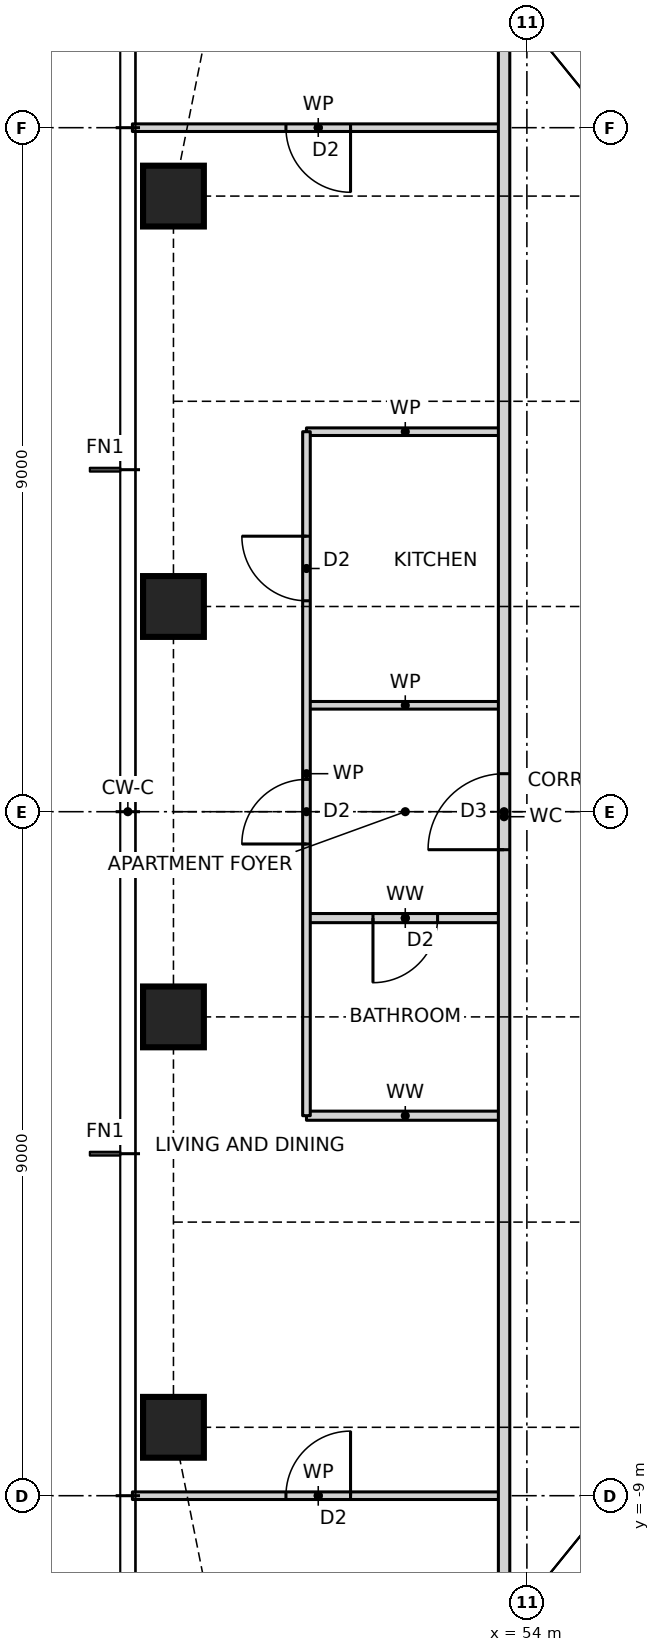
"""IFC4 building model, lengths in metres.
Left out: names, types, materials, properties, quantities, classifications, styles, units other than length and angle.
Written with IfcOpenShell. Run it as: python <this file> out.ifc"""

import sys

from ifc_helpers import new_model, si_unit, direction, frame, frame_2d, origin, origin_2d, place, context, subcontext, project, spatial, rectangle, hollow_rectangle, extrude, element, fill, save


model = new_model("IFC4")
c1 = context("Model", 3, precision=1e-05, world=origin(), true_north=direction((0.0, 1.0)))
c2 = subcontext(c1, "Body", "Model", "MODEL_VIEW")
j1 = project(units=[si_unit("LENGTHUNIT", "METRE"), si_unit("PLANEANGLEUNIT", "RADIAN")], contexts=[c1])
p1 = place(None, origin())
s1 = spatial("IfcSite", under=j1, at=p1, CompositionType="ELEMENT")
p2 = place(p1, origin())
s2 = spatial("IfcBuilding", under=s1, at=p2, CompositionType="ELEMENT")
p3 = place(p2, frame((0.0, 0.0, 126.0)))
s3 = spatial("IfcBuildingStorey", under=s2, at=p3, CompositionType="ELEMENT", Elevation=126.0)
for number, where, z_axis, x_axis in (
    (1, (49.35, 8.1, 0.0), (0.0, 0.0, 1.0), (1.0, 0.0, 0.0)),
    (2, (49.35, 2.7, 0.0), (0.0, 0.0, 1.0), (1.0, 0.0, 0.0)),
    (3, (49.35, -2.7, 0.0), (0.0, 0.0, 1.0), (1.0, 0.0, 0.0)),
    (4, (49.35, -8.1, 0.0), (0.0, 0.0, 1.0), (1.0, 0.0, 0.0)),
):
    element("IfcColumn", number, at=place(p3, frame(where, z_axis=z_axis, x_axis=x_axis)), inside=s3, PredefinedType="COLUMN", context=c2, shape_type="SweptSolid", body=[
        extrude(hollow_rectangle(XDim=0.8, YDim=0.8, WallThickness=0.1, at=origin_2d()), origin(), (0.0, 0.0, 1.0), 3.5),
    ])
p4 = place(p3, frame((48.81, -9.0, 0.0), z_axis=(0.0, 0.0, 1.0), x_axis=(1.0, 0.0, 0.0)))
e5 = element("IfcWall", 5, at=p4, inside=s3, PredefinedType="PARTITIONING", context=c2, shape_type="SweptSolid", body=[
    extrude(rectangle(XDim=4.89, YDim=0.1, at=frame_2d((2.445, 0.0))), origin(), (0.0, 0.0, 1.0), 3.25),
])
p5 = place(p4, frame((2.02, 0.0, 0.0)))
e6 = element("IfcOpeningElement", 6, at=p5, cuts=e5, PredefinedType="OPENING", context=c2, shape_type="SweptSolid", body=[
    extrude(rectangle(XDim=0.85, YDim=2.1, at=frame_2d((0.425, 1.05))), frame((0.0, 0.06, 0.0), z_axis=(0.0, -1.0, 0.0), x_axis=(1.0, 0.0, 0.0)), (0.0, 0.0, 1.0), 0.12),
])
p6 = place(p3, frame((51.1, -4.0, 0.0), z_axis=(0.0, 0.0, 1.0), x_axis=(1.0, 0.0, 0.0)))
e7 = element("IfcWall", 7, at=p6, inside=s3, PredefinedType="PARTITIONING", context=c2, shape_type="SweptSolid", body=[
    extrude(rectangle(XDim=2.6, YDim=0.12, at=frame_2d((1.3, 0.0))), origin(), (0.0, 0.0, 1.0), 3.25),
])
p7 = place(p3, frame((51.1, -1.4, 0.0), z_axis=(0.0, 0.0, 1.0), x_axis=(1.0, 0.0, 0.0)))
e8 = element("IfcWall", 8, at=p7, inside=s3, PredefinedType="PARTITIONING", context=c2, shape_type="SweptSolid", body=[
    extrude(rectangle(XDim=2.6, YDim=0.12, at=frame_2d((1.3, 0.0))), origin(), (0.0, 0.0, 1.0), 3.25),
])
p8 = place(p7, frame((0.875, 0.0, 0.0)))
e9 = element("IfcOpeningElement", 9, at=p8, cuts=e8, PredefinedType="OPENING", context=c2, shape_type="SweptSolid", body=[
    extrude(rectangle(XDim=0.85, YDim=2.1, at=frame_2d((0.425, 1.05))), frame((0.0, 0.07, 0.0), z_axis=(0.0, -1.0, 0.0), x_axis=(1.0, 0.0, 0.0)), (0.0, 0.0, 1.0), 0.14),
])
for number, where, z_axis, x_axis in (
    (10, (51.1, 1.4, 0.0), (0.0, 0.0, 1.0), (1.0, 0.0, 0.0)),
    (11, (51.1, 5.0, 0.0), (0.0, 0.0, 1.0), (1.0, 0.0, 0.0)),
):
    element("IfcWall", number, at=place(p3, frame(where, z_axis=z_axis, x_axis=x_axis)), inside=s3, PredefinedType="PARTITIONING", context=c2, shape_type="SweptSolid", body=[
        extrude(rectangle(XDim=2.6, YDim=0.1, at=frame_2d((1.3, 0.0))), origin(), (0.0, 0.0, 1.0), 3.25),
    ])
p9 = place(p3, frame((48.81, 9.0, 0.0), z_axis=(0.0, 0.0, 1.0), x_axis=(1.0, 0.0, 0.0)))
e12 = element("IfcWall", 12, at=p9, inside=s3, PredefinedType="PARTITIONING", context=c2, shape_type="SweptSolid", body=[
    extrude(rectangle(XDim=4.89, YDim=0.1, at=frame_2d((2.445, 0.0))), origin(), (0.0, 0.0, 1.0), 3.25),
])
p10 = place(p9, frame((2.02, 0.0, 0.0)))
e13 = element("IfcOpeningElement", 13, at=p10, cuts=e12, PredefinedType="OPENING", context=c2, shape_type="SweptSolid", body=[
    extrude(rectangle(XDim=0.85, YDim=2.1, at=frame_2d((0.425, 1.05))), frame((0.0, 0.06, 0.0), z_axis=(0.0, -1.0, 0.0), x_axis=(1.0, 0.0, 0.0)), (0.0, 0.0, 1.0), 0.12),
])
p11 = place(p3, frame((53.7, -10.9, 0.0), z_axis=(0.0, 0.0, 1.0), x_axis=(0.0, 1.0, 0.0)))
e14 = element("IfcWall", 14, at=p11, inside=s3, PredefinedType="PARTITIONING", context=c2, shape_type="SweptSolid", body=[
    extrude(rectangle(XDim=21.668, YDim=0.15, at=frame_2d((10.834, 0.0))), origin(), (0.0, 0.0, 1.0), 3.25),
])
p12 = place(p11, frame((10.4, 0.0, 0.0)))
e15 = element("IfcOpeningElement", 15, at=p12, cuts=e14, PredefinedType="OPENING", context=c2, shape_type="SweptSolid", body=[
    extrude(rectangle(XDim=1.0, YDim=2.1, at=frame_2d((0.5, 1.05))), frame((0.0, 0.085, 0.0), z_axis=(0.0, -1.0, 0.0), x_axis=(1.0, 0.0, 0.0)), (0.0, 0.0, 1.0), 0.17),
])
p13 = place(p3, frame((51.1, -4.0, 0.0), z_axis=(0.0, 0.0, 1.0), x_axis=(0.0, 1.0, 0.0)))
e16 = element("IfcWall", 16, at=p13, inside=s3, PredefinedType="PARTITIONING", context=c2, shape_type="SweptSolid", body=[
    extrude(rectangle(XDim=9.0, YDim=0.1, at=frame_2d((4.5, 0.0))), origin(), (0.0, 0.0, 1.0), 3.25),
])
p14 = place(p13, frame((6.775, 0.0, 0.0)))
e17 = element("IfcOpeningElement", 17, at=p14, cuts=e16, PredefinedType="OPENING", context=c2, shape_type="SweptSolid", body=[
    extrude(rectangle(XDim=0.85, YDim=2.1, at=frame_2d((0.425, 1.05))), frame((0.0, 0.06, 0.0), z_axis=(0.0, -1.0, 0.0), x_axis=(1.0, 0.0, 0.0)), (0.0, 0.0, 1.0), 0.12),
])
p15 = place(p13, frame((3.575, 0.0, 0.0)))
e18 = element("IfcOpeningElement", 18, at=p15, cuts=e16, PredefinedType="OPENING", context=c2, shape_type="SweptSolid", body=[
    extrude(rectangle(XDim=0.85, YDim=2.1, at=frame_2d((0.425, 1.05))), frame((0.0, 0.06, 0.0), z_axis=(0.0, -1.0, 0.0), x_axis=(1.0, 0.0, 0.0)), (0.0, 0.0, 1.0), 0.12),
])
p16 = place(p14, origin())
e19 = element("IfcDoor", 19, at=p16, inside=s3, OperationType="SINGLE_SWING_RIGHT", PredefinedType="DOOR", context=c2, shape_type="SweptSolid", body=[
    extrude(rectangle(XDim=0.85, YDim=2.1, at=frame_2d((0.425, 1.05))), frame((0.0, 0.025, 0.0), z_axis=(0.0, -1.0, 0.0), x_axis=(1.0, 0.0, 0.0)), (0.0, 0.0, 1.0), 0.05),
])
fill(e17, e19)
p17 = place(p12, origin())
e20 = element("IfcDoor", 20, at=p17, inside=s3, OperationType="SINGLE_SWING_LEFT", PredefinedType="DOOR", context=c2, shape_type="SweptSolid", body=[
    extrude(rectangle(XDim=1.0, YDim=2.1, at=frame_2d((0.5, 1.05))), frame((0.0, 0.025, 0.0), z_axis=(0.0, -1.0, 0.0), x_axis=(1.0, 0.0, 0.0)), (0.0, 0.0, 1.0), 0.05),
])
fill(e15, e20)
p18 = place(p15, origin())
e21 = element("IfcDoor", 21, at=p18, inside=s3, OperationType="SINGLE_SWING_LEFT", PredefinedType="DOOR", context=c2, shape_type="SweptSolid", body=[
    extrude(rectangle(XDim=0.85, YDim=2.1, at=frame_2d((0.425, 1.05))), frame((0.0, 0.025, 0.0), z_axis=(0.0, -1.0, 0.0), x_axis=(1.0, 0.0, 0.0)), (0.0, 0.0, 1.0), 0.05),
])
fill(e18, e21)
p19 = place(p8, frame((0.85, 0.0, 0.0), z_axis=(0.0, 0.0, 1.0), x_axis=(-1.0, 0.0, 0.0)))
e22 = element("IfcDoor", 22, at=p19, inside=s3, OperationType="SINGLE_SWING_RIGHT", PredefinedType="DOOR", context=c2, shape_type="SweptSolid", body=[
    extrude(rectangle(XDim=0.85, YDim=2.1, at=frame_2d((0.425, 1.05))), frame((0.0, 0.025, 0.0), z_axis=(0.0, -1.0, 0.0), x_axis=(1.0, 0.0, 0.0)), (0.0, 0.0, 1.0), 0.05),
])
fill(e9, e22)
p20 = place(p10, frame((0.85, 0.0, 0.0), z_axis=(0.0, 0.0, 1.0), x_axis=(-1.0, 0.0, 0.0)))
e23 = element("IfcDoor", 23, at=p20, inside=s3, OperationType="SINGLE_SWING_LEFT", PredefinedType="DOOR", context=c2, shape_type="SweptSolid", body=[
    extrude(rectangle(XDim=0.85, YDim=2.1, at=frame_2d((0.425, 1.05))), frame((0.0, 0.025, 0.0), z_axis=(0.0, -1.0, 0.0), x_axis=(1.0, 0.0, 0.0)), (0.0, 0.0, 1.0), 0.05),
])
fill(e13, e23)
p21 = place(p5, origin())
e24 = element("IfcDoor", 24, at=p21, inside=s3, OperationType="SINGLE_SWING_RIGHT", PredefinedType="DOOR", context=c2, shape_type="SweptSolid", body=[
    extrude(rectangle(XDim=0.85, YDim=2.1, at=frame_2d((0.425, 1.05))), frame((0.0, 0.025, 0.0), z_axis=(0.0, -1.0, 0.0), x_axis=(1.0, 0.0, 0.0)), (0.0, 0.0, 1.0), 0.05),
])
fill(e6, e24)
save(model, sys.argv[1])
